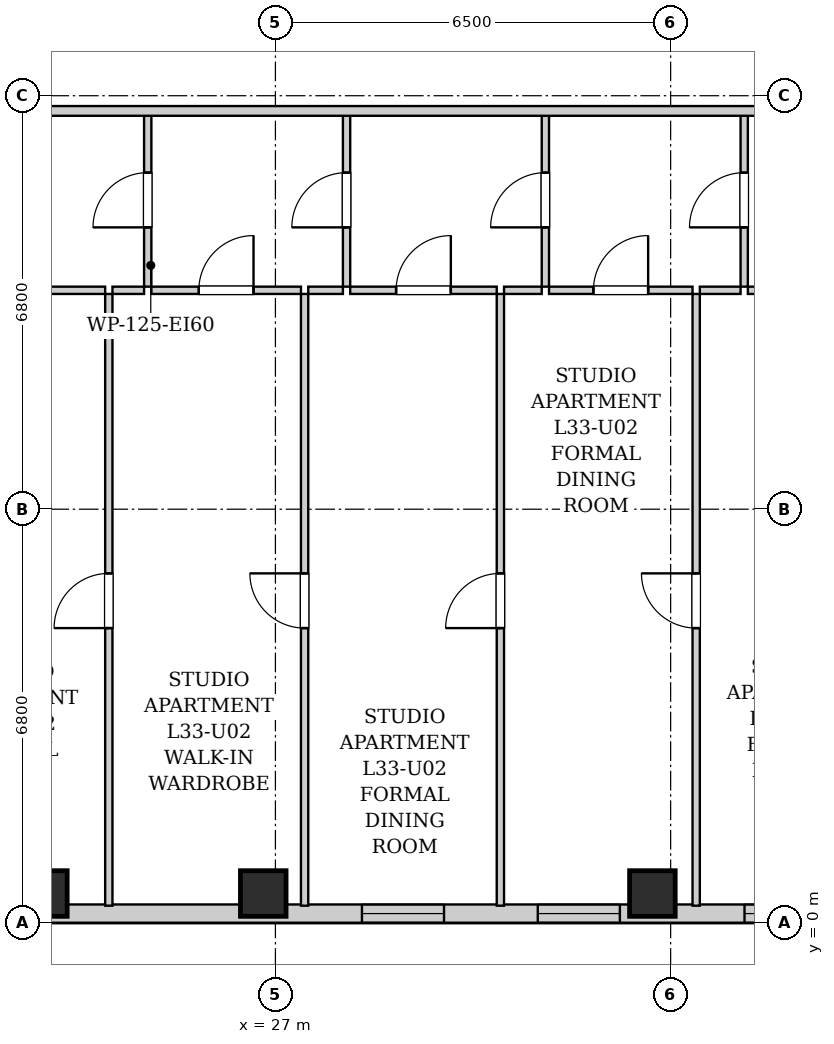
"""IFC4 building model, lengths in metres.
Left out: names, types, materials, properties, quantities, classifications, styles, units other than length and angle.
Written with IfcOpenShell. Run it as: python <this file> out.ifc"""

import sys

from ifc_helpers import new_model, si_unit, direction, frame, frame_2d, origin, origin_2d, place, context, subcontext, project, spatial, rectangle, extrude, element, fill, save


model = new_model("IFC4")
c1 = context("Model", 3, precision=1e-05, world=origin(), true_north=direction((0.0, 1.0)))
c2 = subcontext(c1, "Body", "Model", "MODEL_VIEW")
j1 = project(units=[si_unit("LENGTHUNIT", "METRE"), si_unit("PLANEANGLEUNIT", "RADIAN")], contexts=[c1])
p1 = place(None, origin())
s1 = spatial("IfcSite", under=j1, at=p1, CompositionType="ELEMENT")
p2 = place(p1, origin())
s2 = spatial("IfcBuilding", under=s1, at=p2, CompositionType="ELEMENT")
p3 = place(p2, frame((0.0, 0.0, 116.7)))
s3 = spatial("IfcBuildingStorey", under=s2, at=p3, CompositionType="ELEMENT", Elevation=116.7)
for number, where, z_axis, x_axis in (
    (1, (23.2, 0.48, 0.0), (0.0, 0.0, 1.0), (1.0, 0.0, 0.0)),
    (2, (26.8, 0.48, 0.0), (0.0, 0.0, 1.0), (1.0, 0.0, 0.0)),
    (3, (33.2, 0.48, 0.0), (0.0, 0.0, 1.0), (1.0, 0.0, 0.0)),
):
    element("IfcColumn", number, at=place(p3, frame(where, z_axis=z_axis, x_axis=x_axis)), inside=s3, PredefinedType="COLUMN", context=c2, shape_type="SweptSolid", body=[
        extrude(rectangle(XDim=0.75, YDim=0.75, at=origin_2d()), origin(), (0.0, 0.0, 1.0), 3.2),
    ])
p4 = place(p3, frame((40.9, 0.15, 0.0), z_axis=(0.0, 0.0, 1.0), x_axis=(-1.0, 0.0, 0.0)))
e4 = element("IfcWall", 4, at=p4, inside=s3, PredefinedType="SOLIDWALL", context=c2, shape_type="SweptSolid", body=[
    extrude(rectangle(XDim=21.95, YDim=0.3, at=frame_2d((10.975, 0.0))), origin(), (0.0, 0.0, 1.0), 2.88),
])
p5 = place(p4, frame((20.08, 0.0, 0.55)))
e5 = element("IfcOpeningElement", 5, at=p5, cuts=e4, PredefinedType="OPENING", context=c2, shape_type="SweptSolid", body=[
    extrude(rectangle(XDim=1.35, YDim=1.2, at=frame_2d((0.675, 0.6))), frame((0.0, 0.16, 0.0), z_axis=(0.0, -1.0, 0.0), x_axis=(1.0, 0.0, 0.0)), (0.0, 0.0, 1.0), 0.32),
])
p6 = place(p4, frame((18.4, 0.0, 0.55)))
e6 = element("IfcOpeningElement", 6, at=p6, cuts=e4, PredefinedType="OPENING", context=c2, shape_type="SweptSolid", body=[
    extrude(rectangle(XDim=0.85, YDim=1.2, at=frame_2d((0.425, 0.6))), frame((0.0, 0.16, 0.0), z_axis=(0.0, -1.0, 0.0), x_axis=(1.0, 0.0, 0.0)), (0.0, 0.0, 1.0), 0.32),
])
p7 = place(p4, frame((11.127, 0.0, 0.55)))
e7 = element("IfcOpeningElement", 7, at=p7, cuts=e4, PredefinedType="OPENING", context=c2, shape_type="SweptSolid", body=[
    extrude(rectangle(XDim=1.35, YDim=1.2, at=frame_2d((0.675, 0.6))), frame((0.0, 0.16, 0.0), z_axis=(0.0, -1.0, 0.0), x_axis=(1.0, 0.0, 0.0)), (0.0, 0.0, 1.0), 0.32),
])
p8 = place(p4, frame((8.235, 0.0, 0.55)))
e8 = element("IfcOpeningElement", 8, at=p8, cuts=e4, PredefinedType="OPENING", context=c2, shape_type="SweptSolid", body=[
    extrude(rectangle(XDim=1.35, YDim=1.2, at=frame_2d((0.675, 0.6))), frame((0.0, 0.16, 0.0), z_axis=(0.0, -1.0, 0.0), x_axis=(1.0, 0.0, 0.0)), (0.0, 0.0, 1.0), 0.32),
])
p9 = place(p4, frame((4.835, 0.0, 0.55)))
e9 = element("IfcOpeningElement", 9, at=p9, cuts=e4, PredefinedType="OPENING", context=c2, shape_type="SweptSolid", body=[
    extrude(rectangle(XDim=1.35, YDim=1.2, at=frame_2d((0.675, 0.6))), frame((0.0, 0.16, 0.0), z_axis=(0.0, -1.0, 0.0), x_axis=(1.0, 0.0, 0.0)), (0.0, 0.0, 1.0), 0.32),
])
p10 = place(p3, frame((24.9, 10.46, 0.0), z_axis=(0.0, 0.0, 1.0), x_axis=(0.0, 1.0, 0.0)))
e10 = element("IfcWall", 10, at=p10, inside=s3, PredefinedType="PARTITIONING", context=c2, shape_type="SweptSolid", body=[
    extrude(rectangle(XDim=2.85, YDim=0.12, at=frame_2d((1.425, 0.0))), origin(), (0.0, 0.0, 1.0), 2.88),
])
p11 = place(p10, frame((0.975, 0.0, 0.0)))
e11 = element("IfcOpeningElement", 11, at=p11, cuts=e10, PredefinedType="OPENING", context=c2, shape_type="SweptSolid", body=[
    extrude(rectangle(XDim=0.9, YDim=2.05, at=frame_2d((0.45, 1.025))), frame((0.0, 0.07, 0.0), z_axis=(0.0, -1.0, 0.0), x_axis=(1.0, 0.0, 0.0)), (0.0, 0.0, 1.0), 0.14),
])
p12 = place(p3, frame((21.1, 10.4, 0.0), z_axis=(0.0, 0.0, 1.0), x_axis=(1.0, 0.0, 0.0)))
e12 = element("IfcWall", 12, at=p12, inside=s3, PredefinedType="PARTITIONING", context=c2, shape_type="SweptSolid", body=[
    extrude(rectangle(XDim=3.1, YDim=0.12, at=frame_2d((1.55, 0.0))), origin(), (0.0, 0.0, 1.0), 2.88),
])
p13 = place(p12, frame((1.1, 0.0, 0.0)))
e13 = element("IfcOpeningElement", 13, at=p13, cuts=e12, PredefinedType="OPENING", context=c2, shape_type="SweptSolid", body=[
    extrude(rectangle(XDim=0.9, YDim=2.05, at=frame_2d((0.45, 1.025))), frame((0.0, 0.07, 0.0), z_axis=(0.0, -1.0, 0.0), x_axis=(1.0, 0.0, 0.0)), (0.0, 0.0, 1.0), 0.14),
])
p14 = place(p3, frame((24.32, 10.4, 0.0), z_axis=(0.0, 0.0, 1.0), x_axis=(1.0, 0.0, 0.0)))
e14 = element("IfcWall", 14, at=p14, inside=s3, PredefinedType="PARTITIONING", context=c2, shape_type="SweptSolid", body=[
    extrude(rectangle(XDim=0.52, YDim=0.12, at=frame_2d((0.26, 0.0))), origin(), (0.0, 0.0, 1.0), 2.88),
])
p15 = place(p3, frame((28.17, 10.46, 0.0), z_axis=(0.0, 0.0, 1.0), x_axis=(0.0, 1.0, 0.0)))
e15 = element("IfcWall", 15, at=p15, inside=s3, PredefinedType="PARTITIONING", context=c2, shape_type="SweptSolid", body=[
    extrude(rectangle(XDim=2.85, YDim=0.12, at=frame_2d((1.425, 0.0))), origin(), (0.0, 0.0, 1.0), 2.88),
])
p16 = place(p15, frame((0.975, 0.0, 0.0)))
e16 = element("IfcOpeningElement", 16, at=p16, cuts=e15, PredefinedType="OPENING", context=c2, shape_type="SweptSolid", body=[
    extrude(rectangle(XDim=0.9, YDim=2.05, at=frame_2d((0.45, 1.025))), frame((0.0, 0.07, 0.0), z_axis=(0.0, -1.0, 0.0), x_axis=(1.0, 0.0, 0.0)), (0.0, 0.0, 1.0), 0.14),
])
p17 = place(p3, frame((24.96, 10.4, 0.0), z_axis=(0.0, 0.0, 1.0), x_axis=(1.0, 0.0, 0.0)))
e17 = element("IfcWall", 17, at=p17, inside=s3, PredefinedType="PARTITIONING", context=c2, shape_type="SweptSolid", body=[
    extrude(rectangle(XDim=2.46, YDim=0.12, at=frame_2d((1.23, 0.0))), origin(), (0.0, 0.0, 1.0), 2.88),
])
p18 = place(p17, frame((0.78, 0.0, 0.0)))
e18 = element("IfcOpeningElement", 18, at=p18, cuts=e17, PredefinedType="OPENING", context=c2, shape_type="SweptSolid", body=[
    extrude(rectangle(XDim=0.9, YDim=2.05, at=frame_2d((0.45, 1.025))), frame((0.0, 0.07, 0.0), z_axis=(0.0, -1.0, 0.0), x_axis=(1.0, 0.0, 0.0)), (0.0, 0.0, 1.0), 0.14),
])
p19 = place(p3, frame((27.54, 10.4, 0.0), z_axis=(0.0, 0.0, 1.0), x_axis=(1.0, 0.0, 0.0)))
e19 = element("IfcWall", 19, at=p19, inside=s3, PredefinedType="PARTITIONING", context=c2, shape_type="SweptSolid", body=[
    extrude(rectangle(XDim=0.57, YDim=0.12, at=frame_2d((0.285, 0.0))), origin(), (0.0, 0.0, 1.0), 2.88),
])
p20 = place(p3, frame((31.44, 10.46, 0.0), z_axis=(0.0, 0.0, 1.0), x_axis=(0.0, 1.0, 0.0)))
e20 = element("IfcWall", 20, at=p20, inside=s3, PredefinedType="PARTITIONING", context=c2, shape_type="SweptSolid", body=[
    extrude(rectangle(XDim=2.85, YDim=0.12, at=frame_2d((1.425, 0.0))), origin(), (0.0, 0.0, 1.0), 2.88),
])
p21 = place(p20, frame((0.975, 0.0, 0.0)))
e21 = element("IfcOpeningElement", 21, at=p21, cuts=e20, PredefinedType="OPENING", context=c2, shape_type="SweptSolid", body=[
    extrude(rectangle(XDim=0.9, YDim=2.05, at=frame_2d((0.45, 1.025))), frame((0.0, 0.07, 0.0), z_axis=(0.0, -1.0, 0.0), x_axis=(1.0, 0.0, 0.0)), (0.0, 0.0, 1.0), 0.14),
])
p22 = place(p3, frame((28.23, 10.4, 0.0), z_axis=(0.0, 0.0, 1.0), x_axis=(1.0, 0.0, 0.0)))
e22 = element("IfcWall", 22, at=p22, inside=s3, PredefinedType="PARTITIONING", context=c2, shape_type="SweptSolid", body=[
    extrude(rectangle(XDim=2.41, YDim=0.12, at=frame_2d((1.205, 0.0))), origin(), (0.0, 0.0, 1.0), 2.88),
])
p23 = place(p22, frame((0.755, 0.0, 0.0)))
e23 = element("IfcOpeningElement", 23, at=p23, cuts=e22, PredefinedType="OPENING", context=c2, shape_type="SweptSolid", body=[
    extrude(rectangle(XDim=0.9, YDim=2.05, at=frame_2d((0.45, 1.025))), frame((0.0, 0.07, 0.0), z_axis=(0.0, -1.0, 0.0), x_axis=(1.0, 0.0, 0.0)), (0.0, 0.0, 1.0), 0.14),
])
p24 = place(p3, frame((30.76, 10.4, 0.0), z_axis=(0.0, 0.0, 1.0), x_axis=(1.0, 0.0, 0.0)))
e24 = element("IfcWall", 24, at=p24, inside=s3, PredefinedType="PARTITIONING", context=c2, shape_type="SweptSolid", body=[
    extrude(rectangle(XDim=0.62, YDim=0.12, at=frame_2d((0.31, 0.0))), origin(), (0.0, 0.0, 1.0), 2.88),
])
p25 = place(p3, frame((34.71, 10.46, 0.0), z_axis=(0.0, 0.0, 1.0), x_axis=(0.0, 1.0, 0.0)))
e25 = element("IfcWall", 25, at=p25, inside=s3, PredefinedType="PARTITIONING", context=c2, shape_type="SweptSolid", body=[
    extrude(rectangle(XDim=2.85, YDim=0.12, at=frame_2d((1.425, 0.0))), origin(), (0.0, 0.0, 1.0), 2.88),
])
p26 = place(p25, frame((0.975, 0.0, 0.0)))
e26 = element("IfcOpeningElement", 26, at=p26, cuts=e25, PredefinedType="OPENING", context=c2, shape_type="SweptSolid", body=[
    extrude(rectangle(XDim=0.9, YDim=2.05, at=frame_2d((0.45, 1.025))), frame((0.0, 0.07, 0.0), z_axis=(0.0, -1.0, 0.0), x_axis=(1.0, 0.0, 0.0)), (0.0, 0.0, 1.0), 0.14),
])
p27 = place(p3, frame((31.5, 10.4, 0.0), z_axis=(0.0, 0.0, 1.0), x_axis=(1.0, 0.0, 0.0)))
e27 = element("IfcWall", 27, at=p27, inside=s3, PredefinedType="PARTITIONING", context=c2, shape_type="SweptSolid", body=[
    extrude(rectangle(XDim=2.36, YDim=0.12, at=frame_2d((1.18, 0.0))), origin(), (0.0, 0.0, 1.0), 2.88),
])
p28 = place(p27, frame((0.73, 0.0, 0.0)))
e28 = element("IfcOpeningElement", 28, at=p28, cuts=e27, PredefinedType="OPENING", context=c2, shape_type="SweptSolid", body=[
    extrude(rectangle(XDim=0.9, YDim=2.05, at=frame_2d((0.45, 1.025))), frame((0.0, 0.07, 0.0), z_axis=(0.0, -1.0, 0.0), x_axis=(1.0, 0.0, 0.0)), (0.0, 0.0, 1.0), 0.14),
])
p29 = place(p3, frame((33.98, 10.4, 0.0), z_axis=(0.0, 0.0, 1.0), x_axis=(1.0, 0.0, 0.0)))
e29 = element("IfcWall", 29, at=p29, inside=s3, PredefinedType="PARTITIONING", context=c2, shape_type="SweptSolid", body=[
    extrude(rectangle(XDim=0.67, YDim=0.12, at=frame_2d((0.335, 0.0))), origin(), (0.0, 0.0, 1.0), 2.88),
])
p30 = place(p3, frame((34.77, 10.4, 0.0), z_axis=(0.0, 0.0, 1.0), x_axis=(1.0, 0.0, 0.0)))
e30 = element("IfcWall", 30, at=p30, inside=s3, PredefinedType="PARTITIONING", context=c2, shape_type="SweptSolid", body=[
    extrude(rectangle(XDim=2.31, YDim=0.12, at=frame_2d((1.155, 0.0))), origin(), (0.0, 0.0, 1.0), 2.88),
])
p31 = place(p30, frame((0.705, 0.0, 0.0)))
e31 = element("IfcOpeningElement", 31, at=p31, cuts=e30, PredefinedType="OPENING", context=c2, shape_type="SweptSolid", body=[
    extrude(rectangle(XDim=0.9, YDim=2.05, at=frame_2d((0.45, 1.025))), frame((0.0, 0.07, 0.0), z_axis=(0.0, -1.0, 0.0), x_axis=(1.0, 0.0, 0.0)), (0.0, 0.0, 1.0), 0.14),
])
p32 = place(p3, frame((24.26, 0.28, 0.0), z_axis=(0.0, 0.0, 1.0), x_axis=(0.0, 1.0, 0.0)))
e32 = element("IfcWall", 32, at=p32, inside=s3, PredefinedType="PARTITIONING", context=c2, shape_type="SweptSolid", body=[
    extrude(rectangle(XDim=10.06, YDim=0.12, at=frame_2d((5.03, 0.0))), origin(), (0.0, 0.0, 1.0), 2.88),
])
p33 = place(p32, frame((4.565, 0.0, 0.0)))
e33 = element("IfcOpeningElement", 33, at=p33, cuts=e32, PredefinedType="OPENING", context=c2, shape_type="SweptSolid", body=[
    extrude(rectangle(XDim=0.9, YDim=2.05, at=frame_2d((0.45, 1.025))), frame((0.0, 0.07, 0.0), z_axis=(0.0, -1.0, 0.0), x_axis=(1.0, 0.0, 0.0)), (0.0, 0.0, 1.0), 0.14),
])
p34 = place(p3, frame((27.48, 0.28, 0.0), z_axis=(0.0, 0.0, 1.0), x_axis=(0.0, 1.0, 0.0)))
e34 = element("IfcWall", 34, at=p34, inside=s3, PredefinedType="PARTITIONING", context=c2, shape_type="SweptSolid", body=[
    extrude(rectangle(XDim=10.06, YDim=0.12, at=frame_2d((5.03, 0.0))), origin(), (0.0, 0.0, 1.0), 2.88),
])
p35 = place(p34, frame((4.565, 0.0, 0.0)))
e35 = element("IfcOpeningElement", 35, at=p35, cuts=e34, PredefinedType="OPENING", context=c2, shape_type="SweptSolid", body=[
    extrude(rectangle(XDim=0.9, YDim=2.05, at=frame_2d((0.45, 1.025))), frame((0.0, 0.07, 0.0), z_axis=(0.0, -1.0, 0.0), x_axis=(1.0, 0.0, 0.0)), (0.0, 0.0, 1.0), 0.14),
])
p36 = place(p3, frame((30.7, 0.28, 0.0), z_axis=(0.0, 0.0, 1.0), x_axis=(0.0, 1.0, 0.0)))
e36 = element("IfcWall", 36, at=p36, inside=s3, PredefinedType="PARTITIONING", context=c2, shape_type="SweptSolid", body=[
    extrude(rectangle(XDim=10.06, YDim=0.12, at=frame_2d((5.03, 0.0))), origin(), (0.0, 0.0, 1.0), 2.88),
])
p37 = place(p36, frame((4.565, 0.0, 0.0)))
e37 = element("IfcOpeningElement", 37, at=p37, cuts=e36, PredefinedType="OPENING", context=c2, shape_type="SweptSolid", body=[
    extrude(rectangle(XDim=0.9, YDim=2.05, at=frame_2d((0.45, 1.025))), frame((0.0, 0.07, 0.0), z_axis=(0.0, -1.0, 0.0), x_axis=(1.0, 0.0, 0.0)), (0.0, 0.0, 1.0), 0.14),
])
p38 = place(p3, frame((33.92, 0.28, 0.0), z_axis=(0.0, 0.0, 1.0), x_axis=(0.0, 1.0, 0.0)))
e38 = element("IfcWall", 38, at=p38, inside=s3, PredefinedType="PARTITIONING", context=c2, shape_type="SweptSolid", body=[
    extrude(rectangle(XDim=10.06, YDim=0.12, at=frame_2d((5.03, 0.0))), origin(), (0.0, 0.0, 1.0), 2.88),
])
p39 = place(p38, frame((4.565, 0.0, 0.0)))
e39 = element("IfcOpeningElement", 39, at=p39, cuts=e38, PredefinedType="OPENING", context=c2, shape_type="SweptSolid", body=[
    extrude(rectangle(XDim=0.9, YDim=2.05, at=frame_2d((0.45, 1.025))), frame((0.0, 0.07, 0.0), z_axis=(0.0, -1.0, 0.0), x_axis=(1.0, 0.0, 0.0)), (0.0, 0.0, 1.0), 0.14),
])
p40 = place(p3, frame((10.05, 13.35, 0.0), z_axis=(0.0, 0.0, 1.0), x_axis=(1.0, 0.0, 0.0)))
e40 = element("IfcWall", 40, at=p40, inside=s3, PredefinedType="PARTITIONING", context=c2, shape_type="SweptSolid", body=[
    extrude(rectangle(XDim=30.8, YDim=0.16, at=frame_2d((15.4, 0.0))), origin(), (0.0, 0.0, 1.0), 2.88),
])
p41 = place(p40, frame((3.692, 0.0, 0.0)))
e41 = element("IfcOpeningElement", 41, at=p41, cuts=e40, PredefinedType="OPENING", context=c2, shape_type="SweptSolid", body=[
    extrude(rectangle(XDim=0.95, YDim=2.1, at=frame_2d((0.475, 1.05))), frame((0.0, 0.09, 0.0), z_axis=(0.0, -1.0, 0.0), x_axis=(1.0, 0.0, 0.0)), (0.0, 0.0, 1.0), 0.18),
])
p42 = place(p40, frame((12.095, 0.0, 0.0)))
e42 = element("IfcOpeningElement", 42, at=p42, cuts=e40, PredefinedType="OPENING", context=c2, shape_type="SweptSolid", body=[
    extrude(rectangle(XDim=0.95, YDim=2.1, at=frame_2d((0.475, 1.05))), frame((0.0, 0.09, 0.0), z_axis=(0.0, -1.0, 0.0), x_axis=(1.0, 0.0, 0.0)), (0.0, 0.0, 1.0), 0.18),
])
p43 = place(p11, origin())
e43 = element("IfcDoor", 43, at=p43, inside=s3, OperationType="SINGLE_SWING_LEFT", PredefinedType="DOOR", context=c2, shape_type="SweptSolid", body=[
    extrude(rectangle(XDim=0.9, YDim=2.05, at=frame_2d((0.45, 1.025))), frame((0.0, 0.025, 0.0), z_axis=(0.0, -1.0, 0.0), x_axis=(1.0, 0.0, 0.0)), (0.0, 0.0, 1.0), 0.05),
])
fill(e11, e43)
p44 = place(p16, origin())
e44 = element("IfcDoor", 44, at=p44, inside=s3, OperationType="SINGLE_SWING_LEFT", PredefinedType="DOOR", context=c2, shape_type="SweptSolid", body=[
    extrude(rectangle(XDim=0.9, YDim=2.05, at=frame_2d((0.45, 1.025))), frame((0.0, 0.025, 0.0), z_axis=(0.0, -1.0, 0.0), x_axis=(1.0, 0.0, 0.0)), (0.0, 0.0, 1.0), 0.05),
])
fill(e16, e44)
p45 = place(p18, origin())
e45 = element("IfcDoor", 45, at=p45, inside=s3, OperationType="SINGLE_SWING_RIGHT", PredefinedType="DOOR", context=c2, shape_type="SweptSolid", body=[
    extrude(rectangle(XDim=0.9, YDim=2.05, at=frame_2d((0.45, 1.025))), frame((0.0, 0.025, 0.0), z_axis=(0.0, -1.0, 0.0), x_axis=(1.0, 0.0, 0.0)), (0.0, 0.0, 1.0), 0.05),
])
fill(e18, e45)
p46 = place(p21, origin())
e46 = element("IfcDoor", 46, at=p46, inside=s3, OperationType="SINGLE_SWING_LEFT", PredefinedType="DOOR", context=c2, shape_type="SweptSolid", body=[
    extrude(rectangle(XDim=0.9, YDim=2.05, at=frame_2d((0.45, 1.025))), frame((0.0, 0.025, 0.0), z_axis=(0.0, -1.0, 0.0), x_axis=(1.0, 0.0, 0.0)), (0.0, 0.0, 1.0), 0.05),
])
fill(e21, e46)
p47 = place(p23, origin())
e47 = element("IfcDoor", 47, at=p47, inside=s3, OperationType="SINGLE_SWING_RIGHT", PredefinedType="DOOR", context=c2, shape_type="SweptSolid", body=[
    extrude(rectangle(XDim=0.9, YDim=2.05, at=frame_2d((0.45, 1.025))), frame((0.0, 0.025, 0.0), z_axis=(0.0, -1.0, 0.0), x_axis=(1.0, 0.0, 0.0)), (0.0, 0.0, 1.0), 0.05),
])
fill(e23, e47)
p48 = place(p26, origin())
e48 = element("IfcDoor", 48, at=p48, inside=s3, OperationType="SINGLE_SWING_LEFT", PredefinedType="DOOR", context=c2, shape_type="SweptSolid", body=[
    extrude(rectangle(XDim=0.9, YDim=2.05, at=frame_2d((0.45, 1.025))), frame((0.0, 0.025, 0.0), z_axis=(0.0, -1.0, 0.0), x_axis=(1.0, 0.0, 0.0)), (0.0, 0.0, 1.0), 0.05),
])
fill(e26, e48)
p49 = place(p28, origin())
e49 = element("IfcDoor", 49, at=p49, inside=s3, OperationType="SINGLE_SWING_RIGHT", PredefinedType="DOOR", context=c2, shape_type="SweptSolid", body=[
    extrude(rectangle(XDim=0.9, YDim=2.05, at=frame_2d((0.45, 1.025))), frame((0.0, 0.025, 0.0), z_axis=(0.0, -1.0, 0.0), x_axis=(1.0, 0.0, 0.0)), (0.0, 0.0, 1.0), 0.05),
])
fill(e28, e49)
p50 = place(p33, origin())
e50 = element("IfcDoor", 50, at=p50, inside=s3, OperationType="SINGLE_SWING_LEFT", PredefinedType="DOOR", context=c2, shape_type="SweptSolid", body=[
    extrude(rectangle(XDim=0.9, YDim=2.05, at=frame_2d((0.45, 1.025))), frame((0.0, 0.025, 0.0), z_axis=(0.0, -1.0, 0.0), x_axis=(1.0, 0.0, 0.0)), (0.0, 0.0, 1.0), 0.05),
])
fill(e33, e50)
p51 = place(p35, origin())
e51 = element("IfcDoor", 51, at=p51, inside=s3, OperationType="SINGLE_SWING_RIGHT", PredefinedType="DOOR", context=c2, shape_type="SweptSolid", body=[
    extrude(rectangle(XDim=0.9, YDim=2.05, at=frame_2d((0.45, 1.025))), frame((0.0, 0.025, 0.0), z_axis=(0.0, -1.0, 0.0), x_axis=(1.0, 0.0, 0.0)), (0.0, 0.0, 1.0), 0.05),
])
fill(e35, e51)
p52 = place(p37, origin())
e52 = element("IfcDoor", 52, at=p52, inside=s3, OperationType="SINGLE_SWING_LEFT", PredefinedType="DOOR", context=c2, shape_type="SweptSolid", body=[
    extrude(rectangle(XDim=0.9, YDim=2.05, at=frame_2d((0.45, 1.025))), frame((0.0, 0.025, 0.0), z_axis=(0.0, -1.0, 0.0), x_axis=(1.0, 0.0, 0.0)), (0.0, 0.0, 1.0), 0.05),
])
fill(e37, e52)
p53 = place(p39, origin())
e53 = element("IfcDoor", 53, at=p53, inside=s3, OperationType="SINGLE_SWING_RIGHT", PredefinedType="DOOR", context=c2, shape_type="SweptSolid", body=[
    extrude(rectangle(XDim=0.9, YDim=2.05, at=frame_2d((0.45, 1.025))), frame((0.0, 0.025, 0.0), z_axis=(0.0, -1.0, 0.0), x_axis=(1.0, 0.0, 0.0)), (0.0, 0.0, 1.0), 0.05),
])
fill(e39, e53)
p54 = place(p7, origin())
e54 = element("IfcWindow", 54, at=p54, inside=s3, PartitioningType="SINGLE_PANEL", PredefinedType="WINDOW", context=c2, shape_type="SweptSolid", body=[
    extrude(rectangle(XDim=1.35, YDim=1.2, at=frame_2d((0.675, 0.6))), frame((0.0, 0.03, 0.0), z_axis=(0.0, -1.0, 0.0), x_axis=(1.0, 0.0, 0.0)), (0.0, 0.0, 1.0), 0.06),
])
fill(e7, e54)
p55 = place(p8, origin())
e55 = element("IfcWindow", 55, at=p55, inside=s3, PartitioningType="SINGLE_PANEL", PredefinedType="WINDOW", context=c2, shape_type="SweptSolid", body=[
    extrude(rectangle(XDim=1.35, YDim=1.2, at=frame_2d((0.675, 0.6))), frame((0.0, 0.03, 0.0), z_axis=(0.0, -1.0, 0.0), x_axis=(1.0, 0.0, 0.0)), (0.0, 0.0, 1.0), 0.06),
])
fill(e8, e55)
p56 = place(p9, origin())
e56 = element("IfcWindow", 56, at=p56, inside=s3, PartitioningType="SINGLE_PANEL", PredefinedType="WINDOW", context=c2, shape_type="SweptSolid", body=[
    extrude(rectangle(XDim=1.35, YDim=1.2, at=frame_2d((0.675, 0.6))), frame((0.0, 0.03, 0.0), z_axis=(0.0, -1.0, 0.0), x_axis=(1.0, 0.0, 0.0)), (0.0, 0.0, 1.0), 0.06),
])
fill(e9, e56)
save(model, sys.argv[1])
